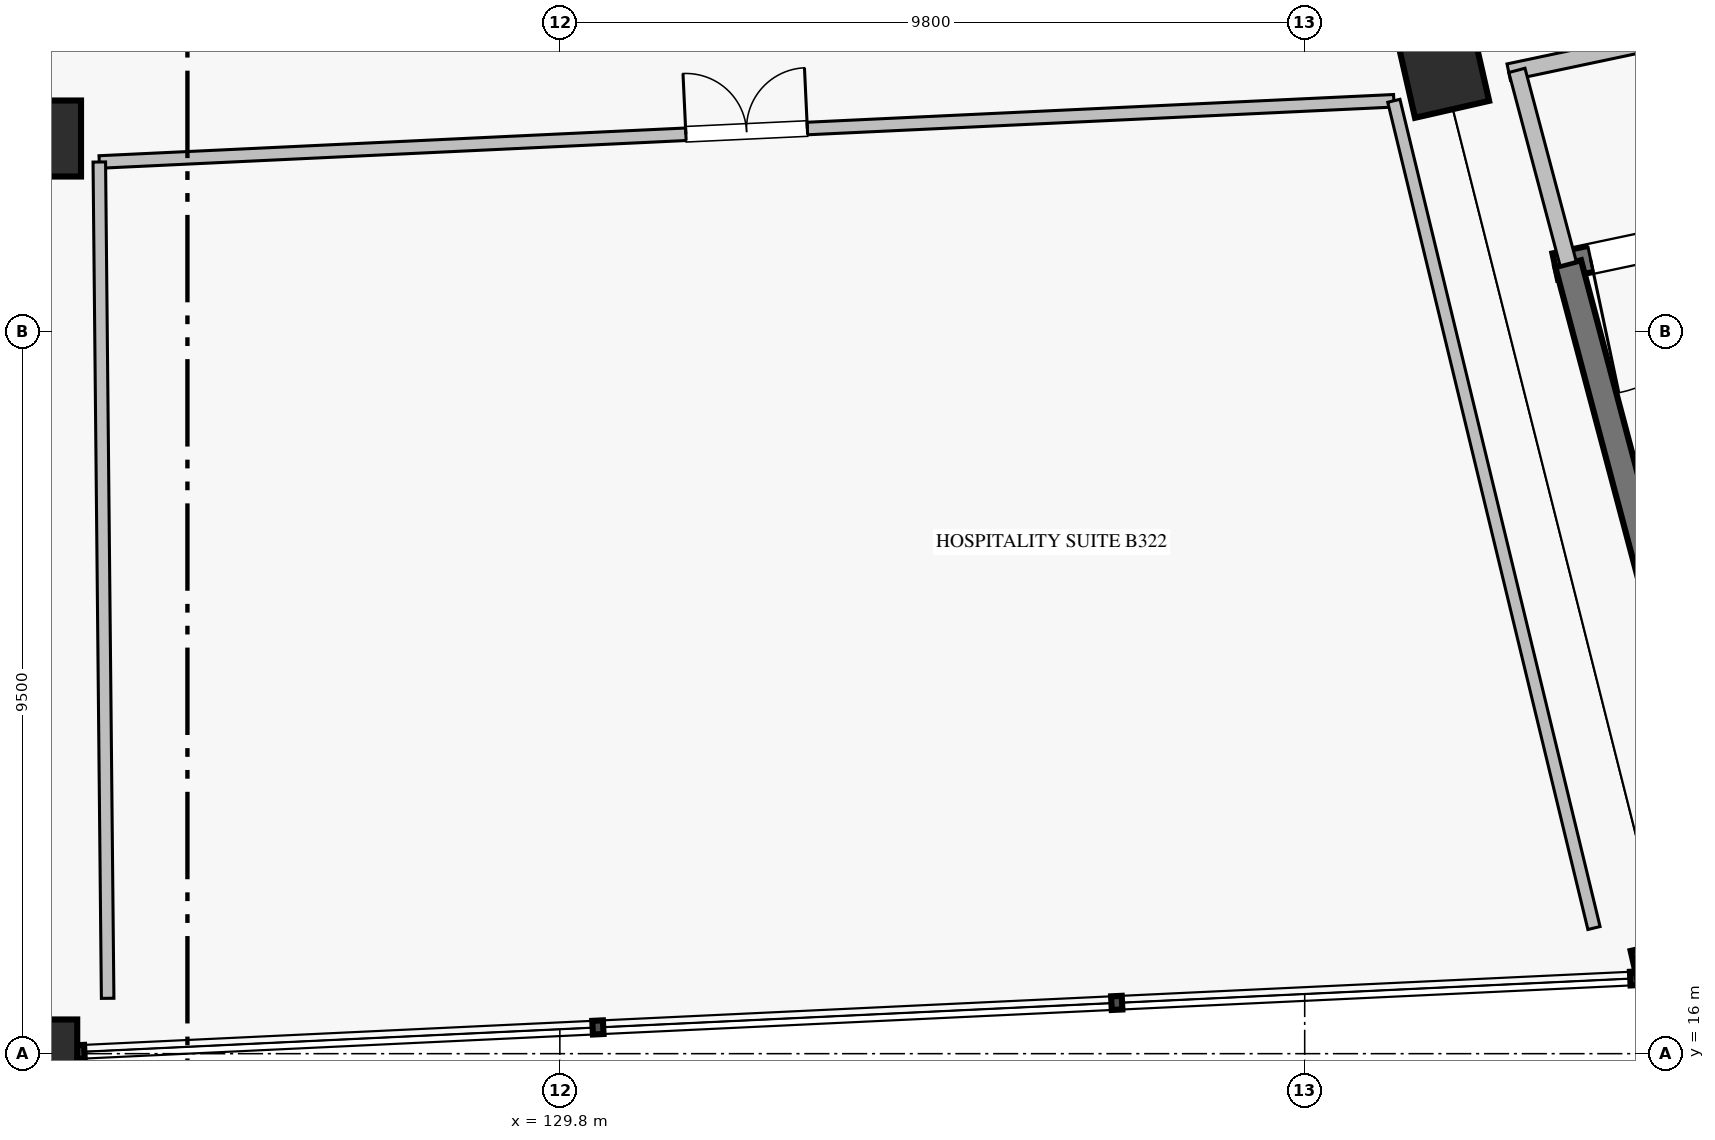
"""IFC4 building model, lengths in metres.
Left out: names, types, materials, properties, quantities, classifications, styles, units other than length and angle.
Written with IfcOpenShell. Run it as: python <this file> out.ifc"""

import sys

from ifc_helpers import new_model, si_unit, direction, frame, frame_2d, origin, origin_2d, place, context, subcontext, project, spatial, rectangle, extrude, element, fill, save


model = new_model("IFC4")
c1 = context("Model", 3, precision=1e-05, world=origin(), true_north=direction((0.0, 1.0)))
c2 = subcontext(c1, "Body", "Model", "MODEL_VIEW")
j1 = project(units=[si_unit("LENGTHUNIT", "METRE"), si_unit("PLANEANGLEUNIT", "RADIAN")], contexts=[c1])
p1 = place(None, origin())
s1 = spatial("IfcSite", under=j1, at=p1, CompositionType="ELEMENT")
p2 = place(p1, origin())
s2 = spatial("IfcBuilding", under=s1, at=p2, CompositionType="ELEMENT")
p3 = place(p2, frame((0.0, 0.0, 15.64)))
s3 = spatial("IfcBuildingStorey", under=s2, at=p3, CompositionType="ELEMENT", Elevation=15.64)
for number, where, z_axis, x_axis in (
    (1, (123.0, 28.04, 0.0), (0.0, 0.0, 1.0), (0.0, -1.0, 0.0)),
    (2, (141.428, 28.911, 0.0), (0.0, 0.0, 1.0), (0.223, -0.975, 0.0)),
):
    element("IfcColumn", number, at=place(p3, frame(where, z_axis=z_axis, x_axis=x_axis)), inside=s3, PredefinedType="COLUMN", context=c2, shape_type="SweptSolid", body=[
        extrude(rectangle(XDim=1.0, YDim=1.0, at=origin_2d()), origin(), (0.0, 0.0, 1.0), 4.76),
    ])
for number, where, z_axis, x_axis in (
    (3, (123.0, 16.0, 0.0), (0.0, 0.0, 1.0), (0.0, -1.0, 0.0)),
    (4, (144.428, 17.013, 0.0), (0.0, 0.0, 1.0), (0.223, -0.975, 0.0)),
):
    element("IfcColumn", number, at=place(p3, frame(where, z_axis=z_axis, x_axis=x_axis)), inside=s3, PredefinedType="COLUMN", context=c2, shape_type="SweptSolid", body=[
        extrude(rectangle(XDim=0.9, YDim=0.9, at=origin_2d()), origin(), (0.0, 0.0, 1.0), 4.76),
    ])
p4 = place(p3, frame((142.896, 26.357, 0.0), z_axis=(0.0, 0.0, 1.0), x_axis=(0.978345203961, 0.206979858648, 0.0)))
e5 = element("IfcWall", 5, at=p4, inside=s3, PredefinedType="SHEAR", context=c2, shape_type="SweptSolid", body=[
    extrude(rectangle(XDim=12.044, YDim=0.35, at=frame_2d((6.022, 0.0))), origin(), (0.0, 0.0, 1.0), 4.46),
])
p5 = place(p4, frame((0.475, 0.0, 0.0)))
e6 = element("IfcOpeningElement", 6, at=p5, cuts=e5, PredefinedType="OPENING", context=c2, shape_type="SweptSolid", body=[
    extrude(rectangle(XDim=1.8, YDim=2.2, at=frame_2d((0.9, 1.1))), frame((0.0, 0.185, 0.0), z_axis=(0.0, -1.0, 0.0), x_axis=(1.0, 0.0, 0.0)), (0.0, 0.0, 1.0), 0.37),
])
p6 = place(p3, frame((143.067, 26.394, 0.0), z_axis=(0.0, 0.0, 1.0), x_axis=(0.256518400663, -0.966539347425, 0.0)))
e7 = element("IfcWall", 7, at=p6, inside=s3, PredefinedType="SHEAR", context=c2, shape_type="SweptSolid", body=[
    extrude(rectangle(XDim=6.84, YDim=0.35, at=frame_2d((3.42, 0.0))), origin(), (0.0, 0.0, 1.0), 4.46),
])
p7 = place(p3, frame((142.284, 28.914, 0.0), z_axis=(0.0, 0.0, 1.0), x_axis=(0.97834522483, 0.206979760008, 0.0)))
e8 = element("IfcWall", 8, at=p7, inside=s3, PredefinedType="SOLIDWALL", context=c2, shape_type="SweptSolid", body=[
    extrude(rectangle(XDim=16.983, YDim=0.22, at=frame_2d((8.491, 0.0))), origin(), (0.0, 0.0, 1.0), 4.46),
])
p8 = place(p7, frame((6.903, 0.0, 0.0)))
e9 = element("IfcOpeningElement", 9, at=p8, cuts=e8, PredefinedType="OPENING", context=c2, shape_type="SweptSolid", body=[
    extrude(rectangle(XDim=1.5, YDim=2.2, at=frame_2d((0.75, 1.1))), frame((0.0, 0.12, 0.0), z_axis=(0.0, -1.0, 0.0), x_axis=(1.0, 0.0, 0.0)), (0.0, 0.0, 1.0), 0.24),
])
p9 = place(p3, frame((142.392, 28.936, 0.0), z_axis=(0.0, 0.0, 1.0), x_axis=(0.256507243456, -0.966542308466, 0.0)))
e10 = element("IfcWall", 10, at=p9, inside=s3, PredefinedType="SOLIDWALL", context=c2, shape_type="SweptSolid", body=[
    extrude(rectangle(XDim=2.631, YDim=0.22, at=frame_2d((1.315, 0.0))), origin(), (0.0, 0.0, 1.0), 4.46),
])
p10 = place(p3, frame((123.74, 27.731, 0.0), z_axis=(0.0, 0.0, 1.0), x_axis=(0.998883826153, 0.047234540851, 0.0)))
e11 = element("IfcWall", 11, at=p10, inside=s3, PredefinedType="PARTITIONING", context=c2, shape_type="SweptSolid", body=[
    extrude(rectangle(XDim=17.052, YDim=0.165, at=frame_2d((8.526, 0.0))), origin(), (0.0, 0.0, 1.0), 3.78),
])
p11 = place(p10, frame((7.726, 0.0, 0.0)))
e12 = element("IfcOpeningElement", 12, at=p11, cuts=e11, PredefinedType="OPENING", context=c2, shape_type="SweptSolid", body=[
    extrude(rectangle(XDim=1.6, YDim=2.3, at=frame_2d((0.8, 1.15))), frame((0.0, 0.093, 0.0), z_axis=(0.0, -1.0, 0.0), x_axis=(1.0, 0.0, 0.0)), (0.0, 0.0, 1.0), 0.185),
])
p12 = place(p3, frame((123.74, 27.731, 0.0), z_axis=(0.0, 0.0, 1.0), x_axis=(0.00998463551, -0.999950152284, 0.0)))
e13 = element("IfcWall", 13, at=p12, inside=s3, PredefinedType="PARTITIONING", context=c2, shape_type="SweptSolid", body=[
    extrude(rectangle(XDim=11.003, YDim=0.165, at=frame_2d((5.501, 0.0))), origin(), (0.0, 0.0, 1.0), 3.78),
])
p13 = place(p3, frame((140.773, 28.536, 0.0), z_axis=(0.0, 0.0, 1.0), x_axis=(0.235146333041, -0.971959979658, 0.0)))
e14 = element("IfcWall", 14, at=p13, inside=s3, PredefinedType="PARTITIONING", context=c2, shape_type="SweptSolid", body=[
    extrude(rectangle(XDim=11.198, YDim=0.165, at=frame_2d((5.599, 0.0))), origin(), (0.0, 0.0, 1.0), 3.78),
])
p14 = place(p5, frame((1.8, 0.0, 0.0), z_axis=(0.0, 0.0, 1.0), x_axis=(-1.0, 0.0, 0.0)))
e15 = element("IfcDoor", 15, at=p14, inside=s3, OperationType="SINGLE_SWING_RIGHT", PredefinedType="DOOR", context=c2, shape_type="SweptSolid", body=[
    extrude(rectangle(XDim=1.8, YDim=2.2, at=frame_2d((0.9, 1.1))), frame((0.0, 0.025, 0.0), z_axis=(0.0, -1.0, 0.0), x_axis=(1.0, 0.0, 0.0)), (0.0, 0.0, 1.0), 0.05),
])
fill(e6, e15)
p15 = place(p11, origin())
e16 = element("IfcDoor", 16, at=p15, inside=s3, OperationType="DOUBLE_DOOR_SINGLE_SWING", PredefinedType="DOOR", context=c2, shape_type="SweptSolid", body=[
    extrude(rectangle(XDim=1.6, YDim=2.3, at=frame_2d((0.8, 1.15))), frame((0.0, 0.025, 0.0), z_axis=(0.0, -1.0, 0.0), x_axis=(1.0, 0.0, 0.0)), (0.0, 0.0, 1.0), 0.05),
])
fill(e12, e16)
save(model, sys.argv[1])
